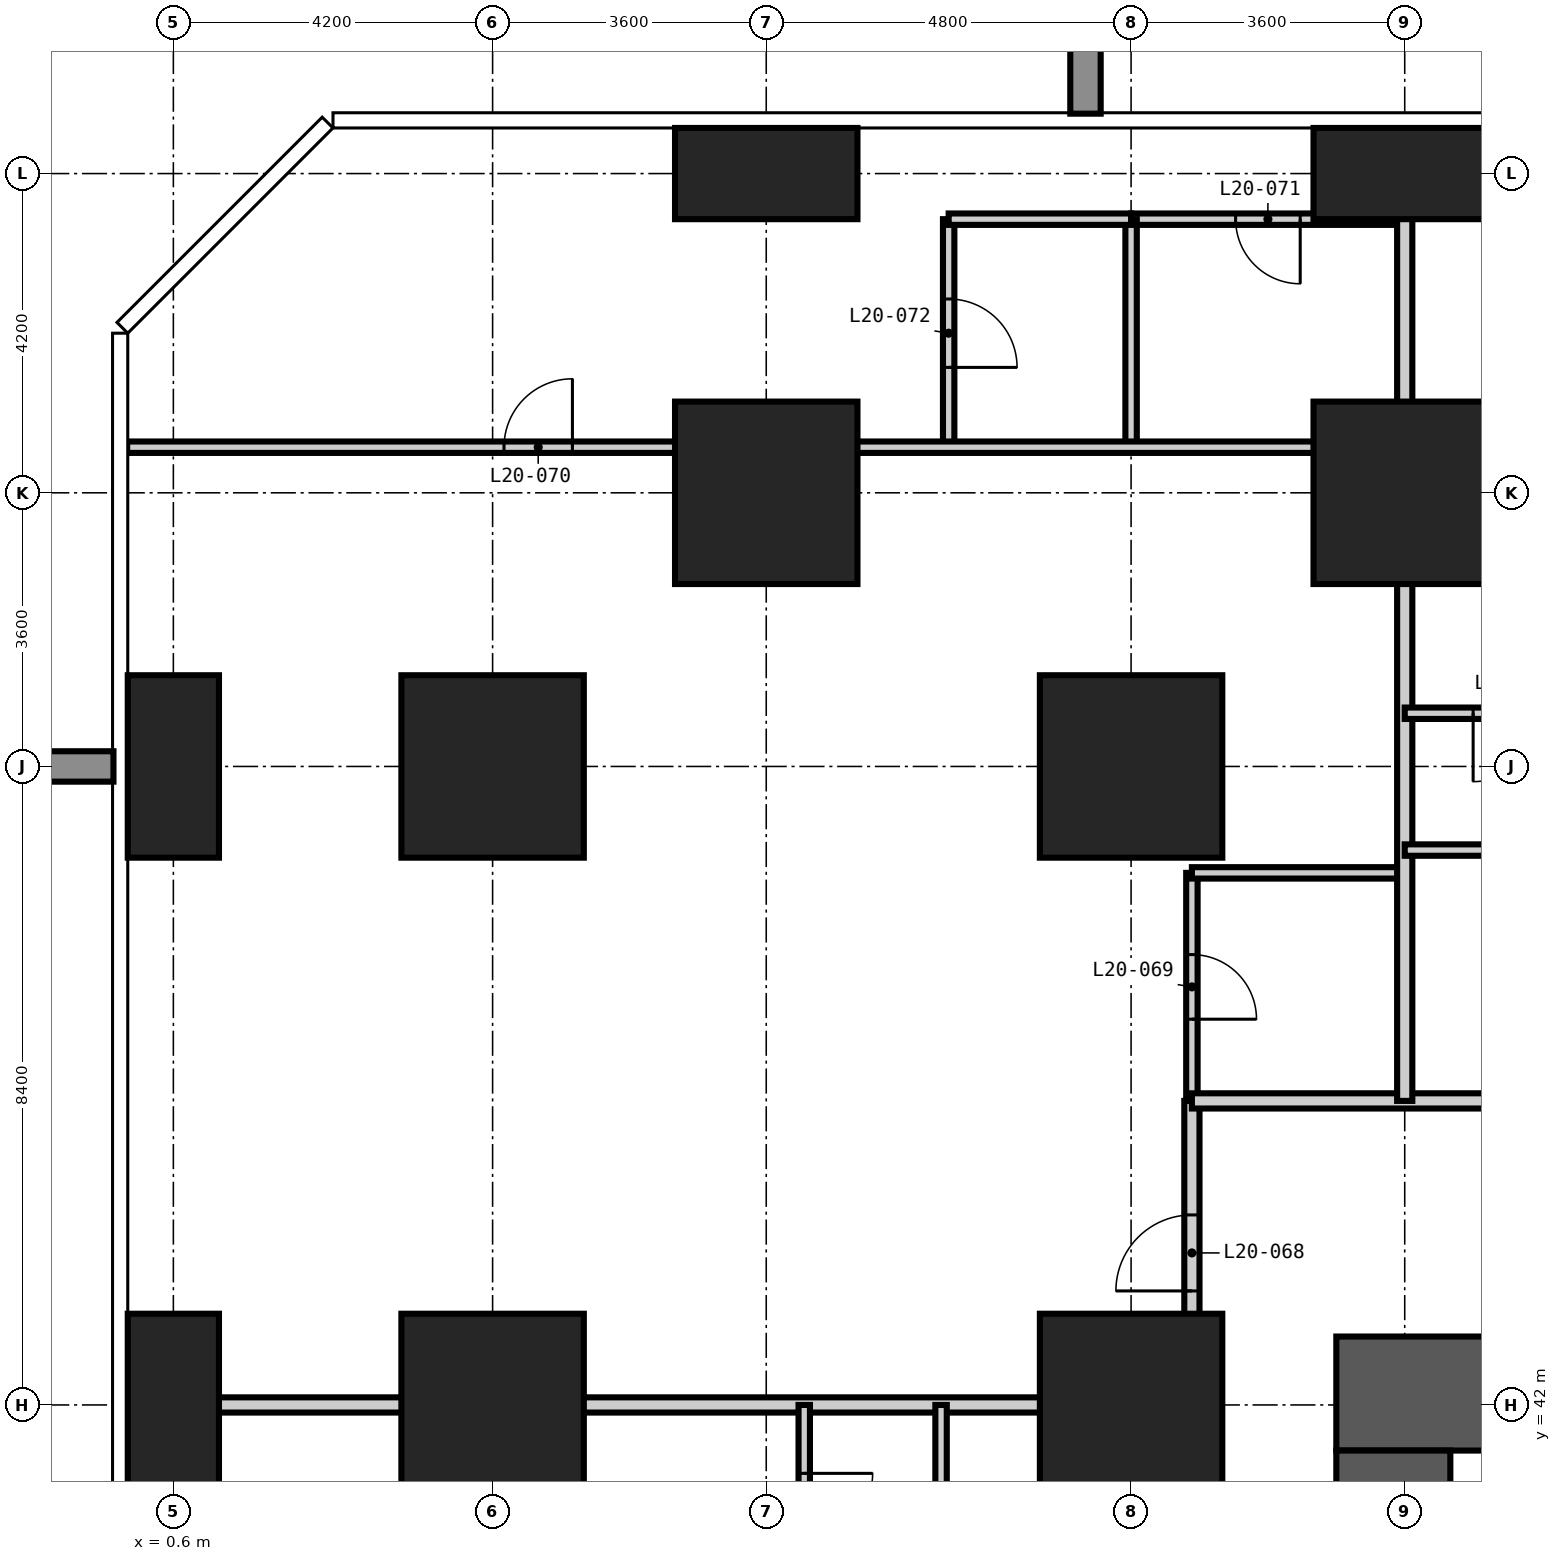
"""IFC4 building model, lengths in metres.
Left out: names, types, materials, properties, quantities, classifications, styles, units other than length and angle.
Written with IfcOpenShell. Run it as: python <this file> out.ifc"""

import sys

from ifc_helpers import new_model, si_unit, direction, frame, frame_2d, origin, origin_2d, place, context, subcontext, project, spatial, rectangle, extrude, element, fill, save


model = new_model("IFC4")
c1 = context("Model", 3, precision=1e-05, world=origin(), true_north=direction((0.0, 1.0)))
c2 = subcontext(c1, "Body", "Model", "MODEL_VIEW")
j1 = project(units=[si_unit("LENGTHUNIT", "METRE"), si_unit("PLANEANGLEUNIT", "RADIAN")], contexts=[c1])
p1 = place(None, origin())
s1 = spatial("IfcSite", under=j1, at=p1, CompositionType="ELEMENT")
p2 = place(p1, origin())
s2 = spatial("IfcBuilding", under=s1, at=p2, CompositionType="ELEMENT")
p3 = place(p2, frame((0.0, 0.0, 81.0)))
s3 = spatial("IfcBuildingStorey", under=s2, at=p3, CompositionType="ELEMENT", Elevation=81.0)
for number, where, z_axis, x_axis in (
    (1, (0.6, 42.0, -0.35), (0.0, 0.0, 1.0), (1.0, 0.0, 0.0)),
    (2, (0.6, 50.4, -0.35), (0.0, 0.0, 1.0), (1.0, 0.0, 0.0)),
):
    element("IfcColumn", number, at=place(p3, frame(where, z_axis=z_axis, x_axis=x_axis)), inside=s3, PredefinedType="COLUMN", context=c2, shape_type="SweptSolid", body=[
        extrude(rectangle(XDim=1.2, YDim=2.4, at=origin_2d()), origin(), (0.0, 0.0, 1.0), 3.6),
    ])
for number, where, z_axis, x_axis in (
    (3, (4.8, 42.0, -0.35), (0.0, 0.0, 1.0), (1.0, 0.0, 0.0)),
    (4, (4.8, 50.4, -0.35), (0.0, 0.0, 1.0), (1.0, 0.0, 0.0)),
    (5, (8.4, 54.0, -0.35), (0.0, 0.0, 1.0), (1.0, 0.0, 0.0)),
):
    element("IfcColumn", number, at=place(p3, frame(where, z_axis=z_axis, x_axis=x_axis)), inside=s3, PredefinedType="COLUMN", context=c2, shape_type="SweptSolid", body=[
        extrude(rectangle(XDim=2.4, YDim=2.4, at=origin_2d()), origin(), (0.0, 0.0, 1.0), 3.6),
    ])
p4 = place(p3, frame((8.4, 58.2, -0.35), z_axis=(0.0, 0.0, 1.0), x_axis=(1.0, 0.0, 0.0)))
e6 = element("IfcColumn", 6, at=p4, inside=s3, PredefinedType="COLUMN", context=c2, shape_type="SweptSolid", body=[
    extrude(rectangle(XDim=2.4, YDim=1.2, at=origin_2d()), origin(), (0.0, 0.0, 1.0), 3.6),
])
for number, where, z_axis, x_axis in (
    (7, (13.2, 42.0, -0.35), (0.0, 0.0, 1.0), (1.0, 0.0, 0.0)),
    (8, (13.2, 50.4, -0.35), (0.0, 0.0, 1.0), (1.0, 0.0, 0.0)),
    (9, (16.8, 54.0, -0.35), (0.0, 0.0, 1.0), (1.0, 0.0, 0.0)),
):
    element("IfcColumn", number, at=place(p3, frame(where, z_axis=z_axis, x_axis=x_axis)), inside=s3, PredefinedType="COLUMN", context=c2, shape_type="SweptSolid", body=[
        extrude(rectangle(XDim=2.4, YDim=2.4, at=origin_2d()), origin(), (0.0, 0.0, 1.0), 3.6),
    ])
p5 = place(p3, frame((16.8, 58.2, -0.35), z_axis=(0.0, 0.0, 1.0), x_axis=(1.0, 0.0, 0.0)))
e10 = element("IfcColumn", 10, at=p5, inside=s3, PredefinedType="COLUMN", context=c2, shape_type="SweptSolid", body=[
    extrude(rectangle(XDim=2.4, YDim=1.2, at=origin_2d()), origin(), (0.0, 0.0, 1.0), 3.6),
])
p6 = place(p3, frame((42.9, 42.15, -0.35), z_axis=(0.0, 0.0, 1.0), x_axis=(-1.0, 0.0, 0.0)))
e11 = element("IfcWall", 11, at=p6, inside=s3, PredefinedType="SHEAR", context=c2, shape_type="SweptSolid", body=[
    extrude(rectangle(XDim=27.0, YDim=1.5, at=frame_2d((13.5, 0.0))), origin(), (0.0, 0.0, 1.0), 3.6),
])
p7 = place(p6, frame((21.4, 0.0, 0.35)))
e12 = element("IfcOpeningElement", 12, at=p7, cuts=e11, PredefinedType="OPENING", context=c2, shape_type="SweptSolid", body=[
    extrude(rectangle(XDim=1.0, YDim=2.1, at=frame_2d((0.5, 1.05))), frame((0.0, 0.76, 0.0), z_axis=(0.0, -1.0, 0.0), x_axis=(1.0, 0.0, 0.0)), (0.0, 0.0, 1.0), 1.52),
])
p8 = place(p6, frame((10.8, 0.0, 0.35)))
e13 = element("IfcOpeningElement", 13, at=p8, cuts=e11, PredefinedType="OPENING", context=c2, shape_type="SweptSolid", body=[
    extrude(rectangle(XDim=1.2, YDim=2.2, at=frame_2d((0.6, 1.1))), frame((0.0, 0.76, 0.0), z_axis=(0.0, -1.0, 0.0), x_axis=(1.0, 0.0, 0.0)), (0.0, 0.0, 1.0), 1.52),
])
p9 = place(p3, frame((16.65, 41.4, -0.35), z_axis=(0.0, 0.0, 1.0), x_axis=(0.0, -1.0, 0.0)))
e14 = element("IfcWall", 14, at=p9, inside=s3, PredefinedType="SHEAR", context=c2, shape_type="SweptSolid", body=[
    extrude(rectangle(XDim=24.0, YDim=1.5, at=frame_2d((12.0, 0.0))), origin(), (0.0, 0.0, 1.0), 3.6),
])
p10 = place(p9, frame((11.1, 0.0, 0.35)))
e15 = element("IfcOpeningElement", 15, at=p10, cuts=e14, PredefinedType="OPENING", context=c2, shape_type="SweptSolid", body=[
    extrude(rectangle(XDim=1.8, YDim=2.2, at=frame_2d((0.9, 1.1))), frame((0.0, 0.76, 0.0), z_axis=(0.0, -1.0, 0.0), x_axis=(1.0, 0.0, 0.0)), (0.0, 0.0, 1.0), 1.52),
])
p11 = place(p9, frame((19.9, 0.0, 0.35)))
e16 = element("IfcOpeningElement", 16, at=p11, cuts=e14, PredefinedType="OPENING", context=c2, shape_type="SweptSolid", body=[
    extrude(rectangle(XDim=1.0, YDim=2.1, at=frame_2d((0.5, 1.05))), frame((0.0, 0.76, 0.0), z_axis=(0.0, -1.0, 0.0), x_axis=(1.0, 0.0, 0.0)), (0.0, 0.0, 1.0), 1.52),
])
p12 = place(p9, frame((5.2, 0.0, 0.35)))
e17 = element("IfcOpeningElement", 17, at=p12, cuts=e14, PredefinedType="OPENING", context=c2, shape_type="SweptSolid", body=[
    extrude(rectangle(XDim=1.0, YDim=2.1, at=frame_2d((0.5, 1.05))), frame((0.0, 0.76, 0.0), z_axis=(0.0, -1.0, 0.0), x_axis=(1.0, 0.0, 0.0)), (0.0, 0.0, 1.0), 1.52),
])
p13 = place(p3, frame((14.0, 46.0, 0.0), z_axis=(0.0, 0.0, 1.0), x_axis=(0.0, 1.0, 0.0)))
e18 = element("IfcWall", 18, at=p13, inside=s3, PredefinedType="PARTITIONING", context=c2, shape_type="SweptSolid", body=[
    extrude(rectangle(XDim=3.0, YDim=0.15, at=frame_2d((1.5, 0.0))), origin(), (0.0, 0.0, 1.0), 3.25),
])
p14 = place(p13, frame((1.075, 0.0, 0.0)))
e19 = element("IfcOpeningElement", 19, at=p14, cuts=e18, PredefinedType="OPENING", context=c2, shape_type="SweptSolid", body=[
    extrude(rectangle(XDim=0.85, YDim=2.1, at=frame_2d((0.425, 1.05))), frame((0.0, 0.085, 0.0), z_axis=(0.0, -1.0, 0.0), x_axis=(1.0, 0.0, 0.0)), (0.0, 0.0, 1.0), 0.17),
])
p15 = place(p3, frame((14.0, 49.0, 0.0), z_axis=(0.0, 0.0, 1.0), x_axis=(1.0, 0.0, 0.0)))
e20 = element("IfcWall", 20, at=p15, inside=s3, PredefinedType="PARTITIONING", context=c2, shape_type="SweptSolid", body=[
    extrude(rectangle(XDim=2.8, YDim=0.15, at=frame_2d((1.4, 0.0))), origin(), (0.0, 0.0, 1.0), 3.25),
])
p16 = place(p3, frame((13.2, 57.6, 0.0), z_axis=(0.0, 0.0, 1.0), x_axis=(1.0, 0.0, 0.0)))
e21 = element("IfcWall", 21, at=p16, inside=s3, PredefinedType="PARTITIONING", context=c2, shape_type="SweptSolid", body=[
    extrude(rectangle(XDim=3.6, YDim=0.15, at=frame_2d((1.8, 0.0))), origin(), (0.0, 0.0, 1.0), 3.25),
])
p17 = place(p16, frame((1.375, 0.0, 0.0)))
e22 = element("IfcOpeningElement", 22, at=p17, cuts=e21, PredefinedType="OPENING", context=c2, shape_type="SweptSolid", body=[
    extrude(rectangle(XDim=0.85, YDim=2.1, at=frame_2d((0.425, 1.05))), frame((0.0, 0.085, 0.0), z_axis=(0.0, -1.0, 0.0), x_axis=(1.0, 0.0, 0.0)), (0.0, 0.0, 1.0), 0.17),
])
p18 = place(p3, frame((14.0, 14.0, 0.0), z_axis=(0.0, 0.0, 1.0), x_axis=(0.0, 1.0, 0.0)))
e23 = element("IfcWall", 23, at=p18, inside=s3, PredefinedType="PARTITIONING", context=c2, shape_type="SweptSolid", body=[
    extrude(rectangle(XDim=32.0, YDim=0.2, at=frame_2d((16.0, 0.0))), origin(), (0.0, 0.0, 1.0), 3.25),
])
p19 = place(p18, frame((5.75, 0.0, 0.0)))
e24 = element("IfcOpeningElement", 24, at=p19, cuts=e23, PredefinedType="OPENING", context=c2, shape_type="SweptSolid", body=[
    extrude(rectangle(XDim=1.0, YDim=2.2, at=frame_2d((0.5, 1.1))), frame((0.0, 0.11, 0.0), z_axis=(0.0, -1.0, 0.0), x_axis=(1.0, 0.0, 0.0)), (0.0, 0.0, 1.0), 0.22),
])
p20 = place(p18, frame((12.5, 0.0, 0.0)))
e25 = element("IfcOpeningElement", 25, at=p20, cuts=e23, PredefinedType="OPENING", context=c2, shape_type="SweptSolid", body=[
    extrude(rectangle(XDim=1.0, YDim=2.2, at=frame_2d((0.5, 1.1))), frame((0.0, 0.11, 0.0), z_axis=(0.0, -1.0, 0.0), x_axis=(1.0, 0.0, 0.0)), (0.0, 0.0, 1.0), 0.22),
])
p21 = place(p18, frame((17.3, 0.0, 0.0)))
e26 = element("IfcOpeningElement", 26, at=p21, cuts=e23, PredefinedType="OPENING", context=c2, shape_type="SweptSolid", body=[
    extrude(rectangle(XDim=1.0, YDim=2.2, at=frame_2d((0.5, 1.1))), frame((0.0, 0.11, 0.0), z_axis=(0.0, -1.0, 0.0), x_axis=(1.0, 0.0, 0.0)), (0.0, 0.0, 1.0), 0.22),
])
p22 = place(p18, frame((24.05, 0.0, 0.0)))
e27 = element("IfcOpeningElement", 27, at=p22, cuts=e23, PredefinedType="OPENING", context=c2, shape_type="SweptSolid", body=[
    extrude(rectangle(XDim=1.0, YDim=2.2, at=frame_2d((0.5, 1.1))), frame((0.0, 0.11, 0.0), z_axis=(0.0, -1.0, 0.0), x_axis=(1.0, 0.0, 0.0)), (0.0, 0.0, 1.0), 0.22),
])
p23 = place(p18, frame((0.5, 0.0, 0.0)))
e28 = element("IfcOpeningElement", 28, at=p23, cuts=e23, PredefinedType="OPENING", context=c2, shape_type="SweptSolid", body=[
    extrude(rectangle(XDim=1.0, YDim=2.2, at=frame_2d((0.5, 1.1))), frame((0.0, 0.11, 0.0), z_axis=(0.0, -1.0, 0.0), x_axis=(1.0, 0.0, 0.0)), (0.0, 0.0, 1.0), 0.22),
])
p24 = place(p18, frame((29.5, 0.0, 0.0)))
e29 = element("IfcOpeningElement", 29, at=p24, cuts=e23, PredefinedType="OPENING", context=c2, shape_type="SweptSolid", body=[
    extrude(rectangle(XDim=1.0, YDim=2.2, at=frame_2d((0.5, 1.1))), frame((0.0, 0.11, 0.0), z_axis=(0.0, -1.0, 0.0), x_axis=(1.0, 0.0, 0.0)), (0.0, 0.0, 1.0), 0.22),
])
p25 = place(p3, frame((14.0, 46.0, 0.0), z_axis=(0.0, 0.0, 1.0), x_axis=(1.0, 0.0, 0.0)))
e30 = element("IfcWall", 30, at=p25, inside=s3, PredefinedType="PARTITIONING", context=c2, shape_type="SweptSolid", body=[
    extrude(rectangle(XDim=31.4, YDim=0.2, at=frame_2d((15.7, 0.0))), origin(), (0.0, 0.0, 1.0), 3.25),
])
p26 = place(p25, frame((5.75, 0.0, 0.0)))
e31 = element("IfcOpeningElement", 31, at=p26, cuts=e30, PredefinedType="OPENING", context=c2, shape_type="SweptSolid", body=[
    extrude(rectangle(XDim=1.0, YDim=2.2, at=frame_2d((0.5, 1.1))), frame((0.0, 0.11, 0.0), z_axis=(0.0, -1.0, 0.0), x_axis=(1.0, 0.0, 0.0)), (0.0, 0.0, 1.0), 0.22),
])
p27 = place(p25, frame((10.7, 0.0, 0.0)))
e32 = element("IfcOpeningElement", 32, at=p27, cuts=e30, PredefinedType="OPENING", context=c2, shape_type="SweptSolid", body=[
    extrude(rectangle(XDim=1.0, YDim=2.2, at=frame_2d((0.5, 1.1))), frame((0.0, 0.11, 0.0), z_axis=(0.0, -1.0, 0.0), x_axis=(1.0, 0.0, 0.0)), (0.0, 0.0, 1.0), 0.22),
])
p28 = place(p25, frame((19.1, 0.0, 0.0)))
e33 = element("IfcOpeningElement", 33, at=p28, cuts=e30, PredefinedType="OPENING", context=c2, shape_type="SweptSolid", body=[
    extrude(rectangle(XDim=1.0, YDim=2.2, at=frame_2d((0.5, 1.1))), frame((0.0, 0.11, 0.0), z_axis=(0.0, -1.0, 0.0), x_axis=(1.0, 0.0, 0.0)), (0.0, 0.0, 1.0), 0.22),
])
p29 = place(p25, frame((24.05, 0.0, 0.0)))
e34 = element("IfcOpeningElement", 34, at=p29, cuts=e30, PredefinedType="OPENING", context=c2, shape_type="SweptSolid", body=[
    extrude(rectangle(XDim=1.0, YDim=2.2, at=frame_2d((0.5, 1.1))), frame((0.0, 0.11, 0.0), z_axis=(0.0, -1.0, 0.0), x_axis=(1.0, 0.0, 0.0)), (0.0, 0.0, 1.0), 0.22),
])
p30 = place(p3, frame((16.8, 46.0, 0.0), z_axis=(0.0, 0.0, 1.0), x_axis=(0.0, 1.0, 0.0)))
e35 = element("IfcWall", 35, at=p30, inside=s3, PredefinedType="PARTITIONING", context=c2, shape_type="SweptSolid", body=[
    extrude(rectangle(XDim=12.808, YDim=0.2, at=frame_2d((6.404, 0.0))), origin(), (0.0, 0.0, 1.0), 3.25),
])
p31 = place(p3, frame((-0.008, 42.0, 0.0), z_axis=(0.0, 0.0, 1.0), x_axis=(1.0, 0.0, 0.0)))
e36 = element("IfcWall", 36, at=p31, inside=s3, PredefinedType="PARTITIONING", context=c2, shape_type="SweptSolid", body=[
    extrude(rectangle(XDim=14.008, YDim=0.2, at=frame_2d((7.004, 0.0))), origin(), (0.0, 0.0, 1.0), 3.25),
])
p32 = place(p3, frame((8.9, 39.3, 0.0), z_axis=(0.0, 0.0, 1.0), x_axis=(0.0, 1.0, 0.0)))
e37 = element("IfcWall", 37, at=p32, inside=s3, PredefinedType="PARTITIONING", context=c2, shape_type="SweptSolid", body=[
    extrude(rectangle(XDim=2.7, YDim=0.15, at=frame_2d((1.35, 0.0))), origin(), (0.0, 0.0, 1.0), 3.25),
])
p33 = place(p32, frame((0.9, 0.0, 0.0)))
e38 = element("IfcOpeningElement", 38, at=p33, cuts=e37, PredefinedType="OPENING", context=c2, shape_type="SweptSolid", body=[
    extrude(rectangle(XDim=0.9, YDim=2.1, at=frame_2d((0.45, 1.05))), frame((0.0, 0.085, 0.0), z_axis=(0.0, -1.0, 0.0), x_axis=(1.0, 0.0, 0.0)), (0.0, 0.0, 1.0), 0.17),
])
p34 = place(p3, frame((10.7, 39.3, 0.0), z_axis=(0.0, 0.0, 1.0), x_axis=(0.0, 1.0, 0.0)))
e39 = element("IfcWall", 39, at=p34, inside=s3, PredefinedType="PARTITIONING", context=c2, shape_type="SweptSolid", body=[
    extrude(rectangle(XDim=2.7, YDim=0.15, at=frame_2d((1.35, 0.0))), origin(), (0.0, 0.0, 1.0), 3.25),
])
p35 = place(p3, frame((10.8, 54.6, 0.0), z_axis=(0.0, 0.0, 1.0), x_axis=(0.0, 1.0, 0.0)))
e40 = element("IfcWall", 40, at=p35, inside=s3, PredefinedType="PARTITIONING", context=c2, shape_type="SweptSolid", body=[
    extrude(rectangle(XDim=3.0, YDim=0.15, at=frame_2d((1.5, 0.0))), origin(), (0.0, 0.0, 1.0), 3.25),
])
p36 = place(p35, frame((1.05, 0.0, 0.0)))
e41 = element("IfcOpeningElement", 41, at=p36, cuts=e40, PredefinedType="OPENING", context=c2, shape_type="SweptSolid", body=[
    extrude(rectangle(XDim=0.9, YDim=2.1, at=frame_2d((0.45, 1.05))), frame((0.0, 0.085, 0.0), z_axis=(0.0, -1.0, 0.0), x_axis=(1.0, 0.0, 0.0)), (0.0, 0.0, 1.0), 0.17),
])
p37 = place(p3, frame((13.2, 54.6, 0.0), z_axis=(0.0, 0.0, 1.0), x_axis=(0.0, 1.0, 0.0)))
e42 = element("IfcWall", 42, at=p37, inside=s3, PredefinedType="PARTITIONING", context=c2, shape_type="SweptSolid", body=[
    extrude(rectangle(XDim=3.0, YDim=0.15, at=frame_2d((1.5, 0.0))), origin(), (0.0, 0.0, 1.0), 3.25),
])
p38 = place(p3, frame((16.8, 49.3, 0.0), z_axis=(0.0, 0.0, 1.0), x_axis=(1.0, 0.0, 0.0)))
e43 = element("IfcWall", 43, at=p38, inside=s3, PredefinedType="PARTITIONING", context=c2, shape_type="SweptSolid", body=[
    extrude(rectangle(XDim=2.7, YDim=0.15, at=frame_2d((1.35, 0.0))), origin(), (0.0, 0.0, 1.0), 3.25),
])
p39 = place(p3, frame((16.8, 51.1, 0.0), z_axis=(0.0, 0.0, 1.0), x_axis=(1.0, 0.0, 0.0)))
e44 = element("IfcWall", 44, at=p39, inside=s3, PredefinedType="PARTITIONING", context=c2, shape_type="SweptSolid", body=[
    extrude(rectangle(XDim=2.7, YDim=0.15, at=frame_2d((1.35, 0.0))), origin(), (0.0, 0.0, 1.0), 3.25),
])
p40 = place(p39, frame((0.9, 0.0, 0.0)))
e45 = element("IfcOpeningElement", 45, at=p40, cuts=e44, PredefinedType="OPENING", context=c2, shape_type="SweptSolid", body=[
    extrude(rectangle(XDim=0.9, YDim=2.1, at=frame_2d((0.45, 1.05))), frame((0.0, 0.085, 0.0), z_axis=(0.0, -1.0, 0.0), x_axis=(1.0, 0.0, 0.0)), (0.0, 0.0, 1.0), 0.17),
])
p41 = place(p3, frame((-0.008, 54.6, 0.0), z_axis=(0.0, 0.0, 1.0), x_axis=(1.0, 0.0, 0.0)))
e46 = element("IfcWall", 46, at=p41, inside=s3, PredefinedType="PARTITIONING", context=c2, shape_type="SweptSolid", body=[
    extrude(rectangle(XDim=16.808, YDim=0.15, at=frame_2d((8.404, 0.0))), origin(), (0.0, 0.0, 1.0), 3.25),
])
p42 = place(p41, frame((4.958, 0.0, 0.0)))
e47 = element("IfcOpeningElement", 47, at=p42, cuts=e46, PredefinedType="OPENING", context=c2, shape_type="SweptSolid", body=[
    extrude(rectangle(XDim=0.9, YDim=2.1, at=frame_2d((0.45, 1.05))), frame((0.0, 0.085, 0.0), z_axis=(0.0, -1.0, 0.0), x_axis=(1.0, 0.0, 0.0)), (0.0, 0.0, 1.0), 0.17),
])
p43 = place(p3, frame((10.8, 57.6, 0.0), z_axis=(0.0, 0.0, 1.0), x_axis=(1.0, 0.0, 0.0)))
e48 = element("IfcWall", 48, at=p43, inside=s3, PredefinedType="PARTITIONING", context=c2, shape_type="SweptSolid", body=[
    extrude(rectangle(XDim=2.4, YDim=0.15, at=frame_2d((1.2, 0.0))), origin(), (0.0, 0.0, 1.0), 3.25),
])
p44 = place(p40, frame((0.9, 0.0, 0.0), z_axis=(0.0, 0.0, 1.0), x_axis=(-1.0, 0.0, 0.0)))
e49 = element("IfcDoor", 49, at=p44, inside=s3, OperationType="SINGLE_SWING_RIGHT", PredefinedType="DOOR", context=c2, shape_type="SweptSolid", body=[
    extrude(rectangle(XDim=0.9, YDim=2.1, at=frame_2d((0.45, 1.05))), frame((0.0, 0.025, 0.0), z_axis=(0.0, -1.0, 0.0), x_axis=(1.0, 0.0, 0.0)), (0.0, 0.0, 1.0), 0.05),
])
fill(e45, e49)
p45 = place(p33, frame((0.9, 0.0, 0.0), z_axis=(0.0, 0.0, 1.0), x_axis=(-1.0, 0.0, 0.0)))
e50 = element("IfcDoor", 50, at=p45, inside=s3, OperationType="SINGLE_SWING_LEFT", PredefinedType="DOOR", context=c2, shape_type="SweptSolid", body=[
    extrude(rectangle(XDim=0.9, YDim=2.1, at=frame_2d((0.45, 1.05))), frame((0.0, 0.025, 0.0), z_axis=(0.0, -1.0, 0.0), x_axis=(1.0, 0.0, 0.0)), (0.0, 0.0, 1.0), 0.05),
])
fill(e38, e50)
p46 = place(p24, origin())
e51 = element("IfcDoor", 51, at=p46, inside=s3, OperationType="SINGLE_SWING_LEFT", PredefinedType="DOOR", context=c2, shape_type="SweptSolid", body=[
    extrude(rectangle(XDim=1.0, YDim=2.2, at=frame_2d((0.5, 1.1))), frame((0.0, 0.025, 0.0), z_axis=(0.0, -1.0, 0.0), x_axis=(1.0, 0.0, 0.0)), (0.0, 0.0, 1.0), 0.05),
])
fill(e29, e51)
p47 = place(p14, frame((0.85, 0.0, 0.0), z_axis=(0.0, 0.0, 1.0), x_axis=(-1.0, 0.0, 0.0)))
e52 = element("IfcDoor", 52, at=p47, inside=s3, OperationType="SINGLE_SWING_RIGHT", PredefinedType="DOOR", context=c2, shape_type="SweptSolid", body=[
    extrude(rectangle(XDim=0.85, YDim=2.1, at=frame_2d((0.425, 1.05))), frame((0.0, 0.025, 0.0), z_axis=(0.0, -1.0, 0.0), x_axis=(1.0, 0.0, 0.0)), (0.0, 0.0, 1.0), 0.05),
])
fill(e19, e52)
p48 = place(p42, origin())
e53 = element("IfcDoor", 53, at=p48, inside=s3, OperationType="SINGLE_SWING_RIGHT", PredefinedType="DOOR", context=c2, shape_type="SweptSolid", body=[
    extrude(rectangle(XDim=0.9, YDim=2.1, at=frame_2d((0.45, 1.05))), frame((0.0, 0.025, 0.0), z_axis=(0.0, -1.0, 0.0), x_axis=(1.0, 0.0, 0.0)), (0.0, 0.0, 1.0), 0.05),
])
fill(e47, e53)
p49 = place(p17, frame((0.85, 0.0, 0.0), z_axis=(0.0, 0.0, 1.0), x_axis=(-1.0, 0.0, 0.0)))
e54 = element("IfcDoor", 54, at=p49, inside=s3, OperationType="SINGLE_SWING_LEFT", PredefinedType="DOOR", context=c2, shape_type="SweptSolid", body=[
    extrude(rectangle(XDim=0.85, YDim=2.1, at=frame_2d((0.425, 1.05))), frame((0.0, 0.025, 0.0), z_axis=(0.0, -1.0, 0.0), x_axis=(1.0, 0.0, 0.0)), (0.0, 0.0, 1.0), 0.05),
])
fill(e22, e54)
p50 = place(p36, frame((0.9, 0.0, 0.0), z_axis=(0.0, 0.0, 1.0), x_axis=(-1.0, 0.0, 0.0)))
e55 = element("IfcDoor", 55, at=p50, inside=s3, OperationType="SINGLE_SWING_RIGHT", PredefinedType="DOOR", context=c2, shape_type="SweptSolid", body=[
    extrude(rectangle(XDim=0.9, YDim=2.1, at=frame_2d((0.45, 1.05))), frame((0.0, 0.025, 0.0), z_axis=(0.0, -1.0, 0.0), x_axis=(1.0, 0.0, 0.0)), (0.0, 0.0, 1.0), 0.05),
])
fill(e41, e55)
save(model, sys.argv[1])
